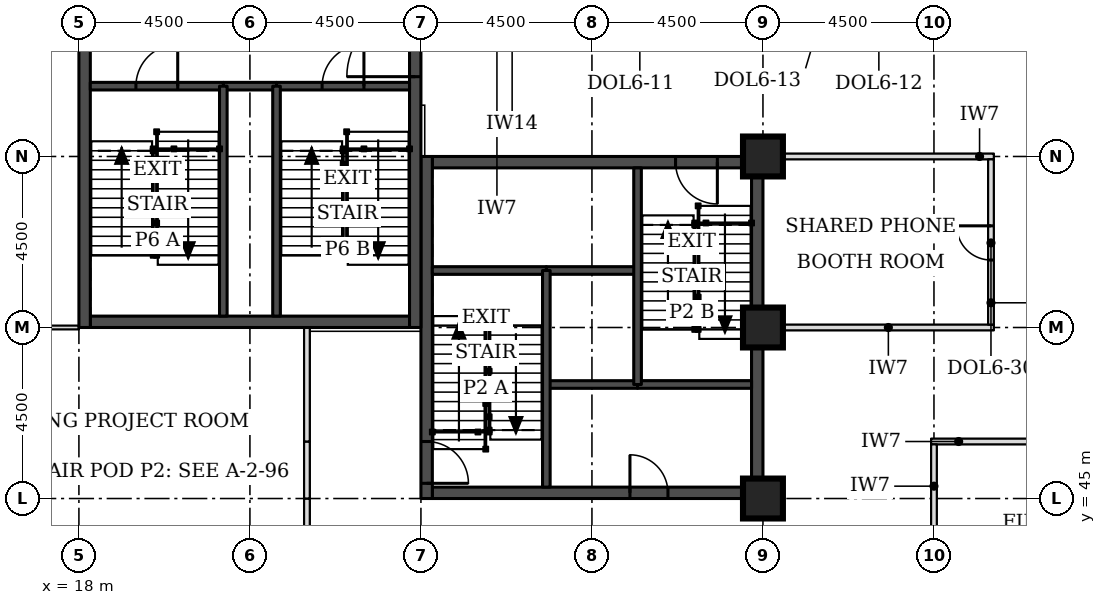
"""IFC4 building model, lengths in metres.
Left out: names, types, materials, properties, quantities, classifications, styles, units other than length and angle.
Written with IfcOpenShell. Run it as: python <this file> out.ifc"""

import sys

from ifc_helpers import new_model, si_unit, direction, frame, frame_2d, origin, origin_2d, place, context, subcontext, project, spatial, rectangle, extrude, element, fill, save


model = new_model("IFC4")
c1 = context("Model", 3, precision=1e-05, world=origin(), true_north=direction((0.0, 1.0)))
c2 = subcontext(c1, "Body", "Model", "MODEL_VIEW")
j1 = project(units=[si_unit("LENGTHUNIT", "METRE"), si_unit("PLANEANGLEUNIT", "RADIAN")], contexts=[c1])
p1 = place(None, origin())
s1 = spatial("IfcSite", under=j1, at=p1, CompositionType="ELEMENT")
p2 = place(p1, origin())
s2 = spatial("IfcBuilding", under=s1, at=p2, CompositionType="ELEMENT")
p3 = place(p2, frame((0.0, 0.0, 115.9)))
s3 = spatial("IfcBuildingStorey", under=s2, at=p3, CompositionType="ELEMENT", Elevation=115.9)
for number, where, z_axis, x_axis in (
    (1, (36.0, 45.0, 0.0), (0.0, 0.0, 1.0), (1.0, 0.0, 0.0)),
    (2, (36.0, 49.5, 0.0), (0.0, 0.0, 1.0), (1.0, 0.0, 0.0)),
    (3, (36.0, 54.0, 0.0), (0.0, 0.0, 1.0), (1.0, 0.0, 0.0)),
):
    element("IfcColumn", number, at=place(p3, frame(where, z_axis=z_axis, x_axis=x_axis)), inside=s3, PredefinedType="COLUMN", context=c2, shape_type="SweptSolid", body=[
        extrude(rectangle(XDim=1.05, YDim=1.05, at=origin_2d()), origin(), (0.0, 0.0, 1.0), 3.7),
    ])
p4 = place(p3, frame((27.3, 45.15, 0.0), z_axis=(0.0, 0.0, 1.0), x_axis=(1.0, 0.0, 0.0)))
e4 = element("IfcWall", 4, at=p4, inside=s3, PredefinedType="SHEAR", context=c2, shape_type="SweptSolid", body=[
    extrude(rectangle(XDim=8.4, YDim=0.3, at=frame_2d((4.2, 0.0))), origin(), (0.0, 0.0, 1.0), 3.7),
])
p5 = place(p4, frame((5.2, 0.0, 0.0)))
e5 = element("IfcOpeningElement", 5, at=p5, cuts=e4, PredefinedType="OPENING", context=c2, shape_type="SweptSolid", body=[
    extrude(rectangle(XDim=1.0, YDim=2.1, at=frame_2d((0.5, 1.05))), frame((0.0, 0.16, 0.0), z_axis=(0.0, -1.0, 0.0), x_axis=(1.0, 0.0, 0.0)), (0.0, 0.0, 1.0), 0.32),
])
p6 = place(p3, frame((27.3, 53.85, 0.0), z_axis=(0.0, 0.0, 1.0), x_axis=(1.0, 0.0, 0.0)))
e6 = element("IfcWall", 6, at=p6, inside=s3, PredefinedType="SHEAR", context=c2, shape_type="SweptSolid", body=[
    extrude(rectangle(XDim=8.4, YDim=0.3, at=frame_2d((4.2, 0.0))), origin(), (0.0, 0.0, 1.0), 3.7),
])
p7 = place(p6, frame((6.4, 0.0, 0.0)))
e7 = element("IfcOpeningElement", 7, at=p7, cuts=e6, PredefinedType="OPENING", context=c2, shape_type="SweptSolid", body=[
    extrude(rectangle(XDim=1.1, YDim=2.1, at=frame_2d((0.55, 1.05))), frame((0.0, 0.16, 0.0), z_axis=(0.0, -1.0, 0.0), x_axis=(1.0, 0.0, 0.0)), (0.0, 0.0, 1.0), 0.32),
])
p8 = place(p3, frame((27.15, 45.0, 0.0), z_axis=(0.0, 0.0, 1.0), x_axis=(0.0, 1.0, 0.0)))
e8 = element("IfcWall", 8, at=p8, inside=s3, PredefinedType="SHEAR", context=c2, shape_type="SweptSolid", body=[
    extrude(rectangle(XDim=9.0, YDim=0.3, at=frame_2d((4.5, 0.0))), origin(), (0.0, 0.0, 1.0), 3.7),
])
p9 = place(p8, frame((0.4, 0.0, 0.0)))
e9 = element("IfcOpeningElement", 9, at=p9, cuts=e8, PredefinedType="OPENING", context=c2, shape_type="SweptSolid", body=[
    extrude(rectangle(XDim=1.1, YDim=2.1, at=frame_2d((0.55, 1.05))), frame((0.0, 0.16, 0.0), z_axis=(0.0, -1.0, 0.0), x_axis=(1.0, 0.0, 0.0)), (0.0, 0.0, 1.0), 0.32),
])
p10 = place(p3, frame((35.85, 45.0, 0.0), z_axis=(0.0, 0.0, 1.0), x_axis=(0.0, 1.0, 0.0)))
e10 = element("IfcWall", 10, at=p10, inside=s3, PredefinedType="SHEAR", context=c2, shape_type="SweptSolid", body=[
    extrude(rectangle(XDim=9.0, YDim=0.3, at=frame_2d((4.5, 0.0))), origin(), (0.0, 0.0, 1.0), 3.7),
])
p11 = place(p3, frame((18.3, 49.65, 0.0), z_axis=(0.0, 0.0, 1.0), x_axis=(1.0, 0.0, 0.0)))
e11 = element("IfcWall", 11, at=p11, inside=s3, PredefinedType="SHEAR", context=c2, shape_type="SweptSolid", body=[
    extrude(rectangle(XDim=8.4, YDim=0.3, at=frame_2d((4.2, 0.0))), origin(), (0.0, 0.0, 1.0), 3.7),
])
p12 = place(p3, frame((18.15, 49.5, 0.0), z_axis=(0.0, 0.0, 1.0), x_axis=(0.0, 1.0, 0.0)))
e12 = element("IfcWall", 12, at=p12, inside=s3, PredefinedType="SHEAR", context=c2, shape_type="SweptSolid", body=[
    extrude(rectangle(XDim=9.0, YDim=0.3, at=frame_2d((4.5, 0.0))), origin(), (0.0, 0.0, 1.0), 3.7),
])
p13 = place(p3, frame((26.85, 49.5, 0.0), z_axis=(0.0, 0.0, 1.0), x_axis=(0.0, 1.0, 0.0)))
e13 = element("IfcWall", 13, at=p13, inside=s3, PredefinedType="SHEAR", context=c2, shape_type="SweptSolid", body=[
    extrude(rectangle(XDim=9.0, YDim=0.3, at=frame_2d((4.5, 0.0))), origin(), (0.0, 0.0, 1.0), 3.7),
])
p14 = place(p13, frame((6.6, 0.0, 0.0)))
e14 = element("IfcOpeningElement", 14, at=p14, cuts=e13, PredefinedType="OPENING", context=c2, shape_type="SweptSolid", body=[
    extrude(rectangle(XDim=1.8, YDim=2.1, at=frame_2d((0.9, 1.05))), frame((0.0, 0.16, 0.0), z_axis=(0.0, -1.0, 0.0), x_axis=(1.0, 0.0, 0.0)), (0.0, 0.0, 1.0), 0.32),
])
p15 = place(p3, frame((12.749, 44.761, 0.0), z_axis=(0.0, 0.0, 1.0), x_axis=(0.707106781187, -0.707106781187, 0.0)))
e15 = element("IfcWall", 15, at=p15, inside=s3, PredefinedType="STANDARD", context=c2, shape_type="SweptSolid", body=[
    extrude(rectangle(XDim=7.089, YDim=0.35, at=frame_2d((3.544, 0.0))), origin(), (0.0, 0.0, 1.0), 3.525),
])
p16 = place(p15, frame((1.894, 0.0, 0.9)))
e16 = element("IfcOpeningElement", 16, at=p16, cuts=e15, PredefinedType="OPENING", context=c2, shape_type="SweptSolid", body=[
    extrude(rectangle(XDim=3.3, YDim=1.9, at=frame_2d((1.65, 0.95))), frame((0.0, 0.185, 0.0), z_axis=(0.0, -1.0, 0.0), x_axis=(1.0, 0.0, 0.0)), (0.0, 0.0, 1.0), 0.37),
])
p17 = place(p3, frame((40.425, 46.5, 0.0), z_axis=(0.0, 0.0, 1.0), x_axis=(1.0, 0.0, 0.0)))
e17 = element("IfcWall", 17, at=p17, inside=s3, PredefinedType="PARTITIONING", context=c2, shape_type="SweptSolid", body=[
    extrude(rectangle(XDim=4.65, YDim=0.15, at=frame_2d((2.325, 0.0))), origin(), (0.0, 0.0, 1.0), 3.55),
])
for number, where, z_axis, x_axis in (
    (18, (36.525, 49.5, 0.0), (0.0, 0.0, 1.0), (1.0, 0.0, 0.0)),
    (19, (36.525, 54.0, 0.0), (0.0, 0.0, 1.0), (1.0, 0.0, 0.0)),
):
    element("IfcWall", number, at=place(p3, frame(where, z_axis=z_axis, x_axis=x_axis)), inside=s3, PredefinedType="PARTITIONING", context=c2, shape_type="SweptSolid", body=[
        extrude(rectangle(XDim=5.55, YDim=0.15, at=frame_2d((2.775, 0.0))), origin(), (0.0, 0.0, 1.0), 3.55),
    ])
p18 = place(p3, frame((24.0, 39.975, 0.0), z_axis=(0.0, 0.0, 1.0), x_axis=(0.0, 1.0, 0.0)))
e20 = element("IfcWall", 20, at=p18, inside=s3, PredefinedType="PARTITIONING", context=c2, shape_type="SweptSolid", body=[
    extrude(rectangle(XDim=5.025, YDim=0.15, at=frame_2d((2.512, 0.0))), origin(), (0.0, 0.0, 1.0), 3.55),
])
p19 = place(p3, frame((40.5, 41.025, 0.0), z_axis=(0.0, 0.0, 1.0), x_axis=(0.0, 1.0, 0.0)))
e21 = element("IfcWall", 21, at=p19, inside=s3, PredefinedType="PARTITIONING", context=c2, shape_type="SweptSolid", body=[
    extrude(rectangle(XDim=5.4, YDim=0.15, at=frame_2d((2.7, 0.0))), origin(), (0.0, 0.0, 1.0), 3.55),
])
p20 = place(p19, frame((2.25, 0.0, 0.0)))
e22 = element("IfcOpeningElement", 22, at=p20, cuts=e21, PredefinedType="OPENING", context=c2, shape_type="SweptSolid", body=[
    extrude(rectangle(XDim=0.9, YDim=2.1, at=frame_2d((0.45, 1.05))), frame((0.0, 0.085, 0.0), z_axis=(0.0, -1.0, 0.0), x_axis=(1.0, 0.0, 0.0)), (0.0, 0.0, 1.0), 0.17),
])
p21 = place(p3, frame((24.0, 45.0, 0.0), z_axis=(0.0, 0.0, 1.0), x_axis=(0.0, 1.0, 0.0)))
e23 = element("IfcWall", 23, at=p21, inside=s3, PredefinedType="PARTITIONING", context=c2, shape_type="SweptSolid", body=[
    extrude(rectangle(XDim=1.5, YDim=0.15, at=frame_2d((0.75, 0.0))), origin(), (0.0, 0.0, 1.0), 3.55),
])
p22 = place(p3, frame((24.0, 46.5, 0.0), z_axis=(0.0, 0.0, 1.0), x_axis=(0.0, 1.0, 0.0)))
e24 = element("IfcWall", 24, at=p22, inside=s3, PredefinedType="PARTITIONING", context=c2, shape_type="SweptSolid", body=[
    extrude(rectangle(XDim=3.0, YDim=0.15, at=frame_2d((1.5, 0.0))), origin(), (0.0, 0.0, 1.0), 3.55),
])
p23 = place(p3, frame((42.0, 49.575, 0.0), z_axis=(0.0, 0.0, 1.0), x_axis=(0.0, 1.0, 0.0)))
e25 = element("IfcWall", 25, at=p23, inside=s3, PredefinedType="PARTITIONING", context=c2, shape_type="SweptSolid", body=[
    extrude(rectangle(XDim=4.35, YDim=0.15, at=frame_2d((2.175, 0.0))), origin(), (0.0, 0.0, 1.0), 3.55),
])
p24 = place(p23, frame((1.7, 0.0, 0.0)))
e26 = element("IfcOpeningElement", 26, at=p24, cuts=e25, PredefinedType="OPENING", context=c2, shape_type="SweptSolid", body=[
    extrude(rectangle(XDim=0.9, YDim=2.1, at=frame_2d((0.45, 1.05))), frame((0.0, 0.085, 0.0), z_axis=(0.0, -1.0, 0.0), x_axis=(1.0, 0.0, 0.0)), (0.0, 0.0, 1.0), 0.17),
])
p25 = place(p3, frame((13.5, 49.5, 0.0), z_axis=(0.0, 0.0, 1.0), x_axis=(1.0, 0.0, 0.0)))
e27 = element("IfcWall", 27, at=p25, inside=s3, PredefinedType="PARTITIONING", context=c2, shape_type="SweptSolid", body=[
    extrude(rectangle(XDim=4.5, YDim=0.1, at=frame_2d((2.25, 0.0))), origin(), (0.0, 0.0, 1.0), 3.55),
])
p26 = place(p25, frame((1.8, 0.0, 0.0)))
e28 = element("IfcOpeningElement", 28, at=p26, cuts=e27, PredefinedType="OPENING", context=c2, shape_type="SweptSolid", body=[
    extrude(rectangle(XDim=0.9, YDim=2.1, at=frame_2d((0.45, 1.05))), frame((0.0, 0.06, 0.0), z_axis=(0.0, -1.0, 0.0), x_axis=(1.0, 0.0, 0.0)), (0.0, 0.0, 1.0), 0.12),
])
p27 = place(p3, frame((30.3, 48.0, 0.0), z_axis=(0.0, 0.0, 1.0), x_axis=(1.0, 0.0, 0.0)))
e29 = element("IfcWall", 29, at=p27, inside=s3, PredefinedType="SOLIDWALL", context=c2, shape_type="SweptSolid", body=[
    extrude(rectangle(XDim=2.4, YDim=0.2, at=frame_2d((1.2, 0.0))), origin(), (0.0, 0.0, 1.0), 3.55),
])
p28 = place(p3, frame((32.7, 48.0, 0.0), z_axis=(0.0, 0.0, 1.0), x_axis=(1.0, 0.0, 0.0)))
e30 = element("IfcWall", 30, at=p28, inside=s3, PredefinedType="SOLIDWALL", context=c2, shape_type="SweptSolid", body=[
    extrude(rectangle(XDim=3.0, YDim=0.2, at=frame_2d((1.5, 0.0))), origin(), (0.0, 0.0, 1.0), 3.55),
])
p29 = place(p3, frame((30.3, 51.0, 0.0), z_axis=(0.0, 0.0, 1.0), x_axis=(1.0, 0.0, 0.0)))
e31 = element("IfcWall", 31, at=p29, inside=s3, PredefinedType="SOLIDWALL", context=c2, shape_type="SweptSolid", body=[
    extrude(rectangle(XDim=2.4, YDim=0.2, at=frame_2d((1.2, 0.0))), origin(), (0.0, 0.0, 1.0), 3.7),
])
p30 = place(p3, frame((27.3, 51.0, 0.0), z_axis=(0.0, 0.0, 1.0), x_axis=(1.0, 0.0, 0.0)))
e32 = element("IfcWall", 32, at=p30, inside=s3, PredefinedType="SOLIDWALL", context=c2, shape_type="SweptSolid", body=[
    extrude(rectangle(XDim=3.0, YDim=0.2, at=frame_2d((1.5, 0.0))), origin(), (0.0, 0.0, 1.0), 3.55),
])
for number, where, z_axis, x_axis in (
    (33, (30.3, 45.3, 0.0), (0.0, 0.0, 1.0), (0.0, 1.0, 0.0)),
    (34, (32.7, 48.0, 0.0), (0.0, 0.0, 1.0), (0.0, 1.0, 0.0)),
):
    element("IfcWall", number, at=place(p3, frame(where, z_axis=z_axis, x_axis=x_axis)), inside=s3, PredefinedType="SOLIDWALL", context=c2, shape_type="SweptSolid", body=[
        extrude(rectangle(XDim=5.7, YDim=0.2, at=frame_2d((2.85, 0.0))), origin(), (0.0, 0.0, 1.0), 3.55),
    ])
p31 = place(p3, frame((21.8, 55.85, 0.0), z_axis=(0.0, 0.0, 1.0), x_axis=(1.0, 0.0, 0.0)))
e35 = element("IfcWall", 35, at=p31, inside=s3, PredefinedType="SOLIDWALL", context=c2, shape_type="SweptSolid", body=[
    extrude(rectangle(XDim=1.4, YDim=0.2, at=frame_2d((0.7, 0.0))), origin(), (0.0, 0.0, 1.0), 3.55),
])
p32 = place(p3, frame((18.3, 55.85, 0.0), z_axis=(0.0, 0.0, 1.0), x_axis=(1.0, 0.0, 0.0)))
e36 = element("IfcWall", 36, at=p32, inside=s3, PredefinedType="SOLIDWALL", context=c2, shape_type="SweptSolid", body=[
    extrude(rectangle(XDim=3.5, YDim=0.2, at=frame_2d((1.75, 0.0))), origin(), (0.0, 0.0, 1.0), 3.55),
])
p33 = place(p32, frame((1.2, 0.0, 0.0)))
e37 = element("IfcOpeningElement", 37, at=p33, cuts=e36, PredefinedType="OPENING", context=c2, shape_type="SweptSolid", body=[
    extrude(rectangle(XDim=1.1, YDim=2.1, at=frame_2d((0.55, 1.05))), frame((0.0, 0.11, 0.0), z_axis=(0.0, -1.0, 0.0), x_axis=(1.0, 0.0, 0.0)), (0.0, 0.0, 1.0), 0.22),
])
p34 = place(p3, frame((23.2, 55.85, 0.0), z_axis=(0.0, 0.0, 1.0), x_axis=(1.0, 0.0, 0.0)))
e38 = element("IfcWall", 38, at=p34, inside=s3, PredefinedType="SOLIDWALL", context=c2, shape_type="SweptSolid", body=[
    extrude(rectangle(XDim=3.5, YDim=0.2, at=frame_2d((1.75, 0.0))), origin(), (0.0, 0.0, 1.0), 3.55),
])
p35 = place(p34, frame((1.2, 0.0, 0.0)))
e39 = element("IfcOpeningElement", 39, at=p35, cuts=e38, PredefinedType="OPENING", context=c2, shape_type="SweptSolid", body=[
    extrude(rectangle(XDim=1.1, YDim=2.1, at=frame_2d((0.55, 1.05))), frame((0.0, 0.11, 0.0), z_axis=(0.0, -1.0, 0.0), x_axis=(1.0, 0.0, 0.0)), (0.0, 0.0, 1.0), 0.22),
])
for number, where, z_axis, x_axis in (
    (40, (21.8, 49.8, 0.0), (0.0, 0.0, 1.0), (0.0, 1.0, 0.0)),
    (41, (23.2, 49.8, 0.0), (0.0, 0.0, 1.0), (0.0, 1.0, 0.0)),
):
    element("IfcWall", number, at=place(p3, frame(where, z_axis=z_axis, x_axis=x_axis)), inside=s3, PredefinedType="SOLIDWALL", context=c2, shape_type="SweptSolid", body=[
        extrude(rectangle(XDim=6.05, YDim=0.2, at=frame_2d((3.025, 0.0))), origin(), (0.0, 0.0, 1.0), 3.55),
    ])
p36 = place(p24, origin())
e42 = element("IfcDoor", 42, at=p36, inside=s3, OperationType="SINGLE_SWING_RIGHT", PredefinedType="DOOR", context=c2, shape_type="SweptSolid", body=[
    extrude(rectangle(XDim=0.9, YDim=2.1, at=frame_2d((0.45, 1.05))), frame((0.0, 0.025, 0.0), z_axis=(0.0, -1.0, 0.0), x_axis=(1.0, 0.0, 0.0)), (0.0, 0.0, 1.0), 0.05),
])
fill(e26, e42)
p37 = place(p9, frame((1.1, 0.0, 0.0), z_axis=(0.0, 0.0, 1.0), x_axis=(-1.0, 0.0, 0.0)))
e43 = element("IfcDoor", 43, at=p37, inside=s3, OperationType="SINGLE_SWING_RIGHT", PredefinedType="DOOR", context=c2, shape_type="SweptSolid", body=[
    extrude(rectangle(XDim=1.1, YDim=2.1, at=frame_2d((0.55, 1.05))), frame((0.0, 0.025, 0.0), z_axis=(0.0, -1.0, 0.0), x_axis=(1.0, 0.0, 0.0)), (0.0, 0.0, 1.0), 0.05),
])
fill(e9, e43)
p38 = place(p7, frame((1.1, 0.0, 0.0), z_axis=(0.0, 0.0, 1.0), x_axis=(-1.0, 0.0, 0.0)))
e44 = element("IfcDoor", 44, at=p38, inside=s3, OperationType="SINGLE_SWING_LEFT", PredefinedType="DOOR", context=c2, shape_type="SweptSolid", body=[
    extrude(rectangle(XDim=1.1, YDim=2.1, at=frame_2d((0.55, 1.05))), frame((0.0, 0.025, 0.0), z_axis=(0.0, -1.0, 0.0), x_axis=(1.0, 0.0, 0.0)), (0.0, 0.0, 1.0), 0.05),
])
fill(e7, e44)
p39 = place(p5, origin())
e45 = element("IfcDoor", 45, at=p39, inside=s3, OperationType="SINGLE_SWING_LEFT", PredefinedType="DOOR", context=c2, shape_type="SweptSolid", body=[
    extrude(rectangle(XDim=1.0, YDim=2.1, at=frame_2d((0.5, 1.05))), frame((0.0, 0.025, 0.0), z_axis=(0.0, -1.0, 0.0), x_axis=(1.0, 0.0, 0.0)), (0.0, 0.0, 1.0), 0.05),
])
fill(e5, e45)
p40 = place(p33, origin())
e46 = element("IfcDoor", 46, at=p40, inside=s3, OperationType="SINGLE_SWING_RIGHT", PredefinedType="DOOR", context=c2, shape_type="SweptSolid", body=[
    extrude(rectangle(XDim=1.1, YDim=2.1, at=frame_2d((0.55, 1.05))), frame((0.0, 0.025, 0.0), z_axis=(0.0, -1.0, 0.0), x_axis=(1.0, 0.0, 0.0)), (0.0, 0.0, 1.0), 0.05),
])
fill(e37, e46)
p41 = place(p35, origin())
e47 = element("IfcDoor", 47, at=p41, inside=s3, OperationType="SINGLE_SWING_RIGHT", PredefinedType="DOOR", context=c2, shape_type="SweptSolid", body=[
    extrude(rectangle(XDim=1.1, YDim=2.1, at=frame_2d((0.55, 1.05))), frame((0.0, 0.025, 0.0), z_axis=(0.0, -1.0, 0.0), x_axis=(1.0, 0.0, 0.0)), (0.0, 0.0, 1.0), 0.05),
])
fill(e39, e47)
p42 = place(p14, origin())
e48 = element("IfcDoor", 48, at=p42, inside=s3, OperationType="SINGLE_SWING_LEFT", PredefinedType="DOOR", context=c2, shape_type="SweptSolid", body=[
    extrude(rectangle(XDim=1.8, YDim=2.1, at=frame_2d((0.9, 1.05))), frame((0.0, 0.025, 0.0), z_axis=(0.0, -1.0, 0.0), x_axis=(1.0, 0.0, 0.0)), (0.0, 0.0, 1.0), 0.05),
])
fill(e14, e48)
save(model, sys.argv[1])
